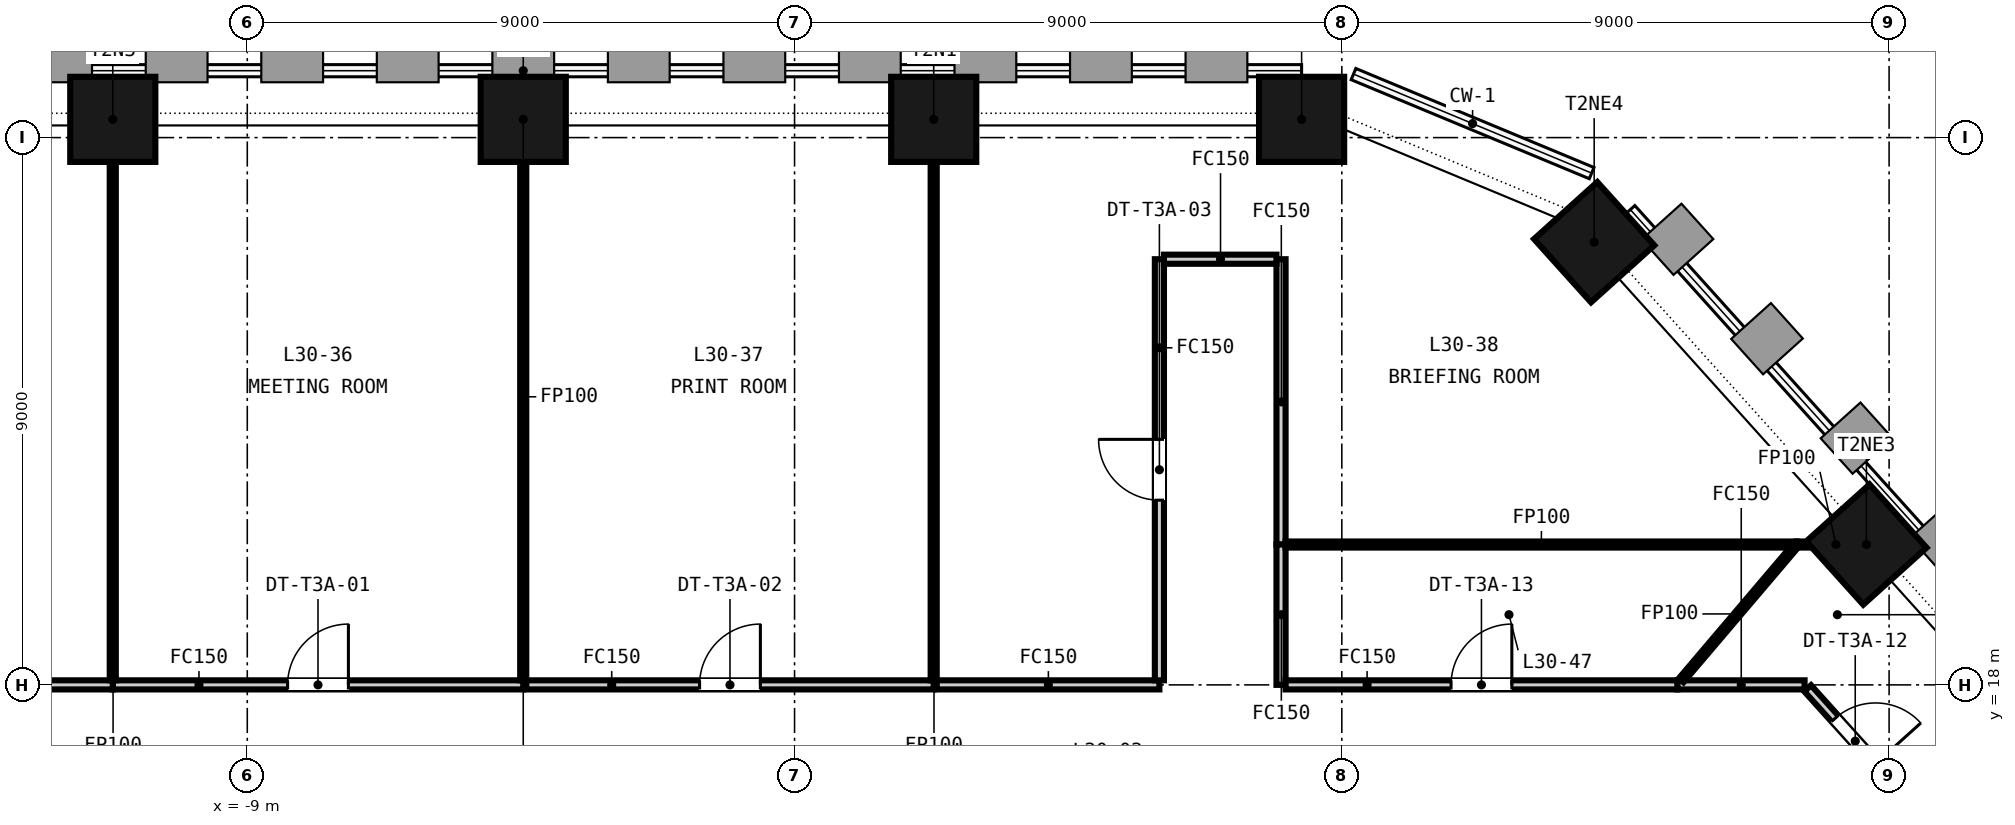
"""IFC4 building model, lengths in metres.
Left out: names, types, materials, properties, quantities, classifications, styles, units other than length and angle.
Written with IfcOpenShell. Run it as: python <this file> out.ifc"""

import sys

from ifc_helpers import new_model, si_unit, direction, frame, frame_2d, origin, origin_2d, place, context, subcontext, project, spatial, rectangle, extrude, element, fill, save


model = new_model("IFC4")
c1 = context("Model", 3, precision=1e-05, world=origin(), true_north=direction((0.0, 1.0)))
c2 = subcontext(c1, "Body", "Model", "MODEL_VIEW")
j1 = project(units=[si_unit("LENGTHUNIT", "METRE"), si_unit("PLANEANGLEUNIT", "RADIAN")], contexts=[c1])
p1 = place(None, origin())
s1 = spatial("IfcSite", under=j1, at=p1, CompositionType="ELEMENT")
p2 = place(p1, origin())
s2 = spatial("IfcBuilding", under=s1, at=p2, CompositionType="ELEMENT")
p3 = place(p2, frame((0.0, 0.0, 126.15)))
s3 = spatial("IfcBuildingStorey", under=s2, at=p3, CompositionType="ELEMENT", Elevation=126.15)
for number, where, z_axis, x_axis in (
    (1, (8.339, 27.3, -0.15), (0.0, 0.0, 1.0), (-1.0, 0.0, 0.0)),
    (2, (2.288, 27.3, -0.15), (0.0, 0.0, 1.0), (-1.0, 0.0, 0.0)),
    (3, (-4.462, 27.3, -0.15), (0.0, 0.0, 1.0), (-1.0, 0.0, 0.0)),
    (4, (-11.212, 27.3, -0.15), (0.0, 0.0, 1.0), (-1.0, 0.0, 0.0)),
    (5, (17.627, 20.308, -0.15), (0.0, 0.0, 1.0), (-0.669, 0.743, 0.0)),
    (6, (13.15, 25.28, -0.15), (0.0, 0.0, 1.0), (-0.669, 0.743, 0.0)),
):
    element("IfcColumn", number, at=place(p3, frame(where, z_axis=z_axis, x_axis=x_axis)), inside=s3, PredefinedType="COLUMN", context=c2, shape_type="SweptSolid", body=[
        extrude(rectangle(XDim=1.4, YDim=1.4, at=origin_2d()), origin(), (0.0, 0.0, 1.0), 3.65),
    ])
p4 = place(p3, frame((8.0, 25.0, 0.0), z_axis=(0.0, 0.0, 1.0), x_axis=(0.0, -1.0, 0.0)))
e7 = element("IfcWall", 7, at=p4, inside=s3, PredefinedType="PARTITIONING", context=c2, shape_type="SweptSolid", body=[
    extrude(rectangle(XDim=4.692, YDim=0.15, at=frame_2d((2.346, 0.0))), origin(), (0.0, 0.0, 1.0), 2.741),
])
p5 = place(p3, frame((8.0, 20.308, 0.0), z_axis=(0.0, 0.0, 1.0), x_axis=(0.0, -1.0, 0.0)))
e8 = element("IfcWall", 8, at=p5, inside=s3, PredefinedType="PARTITIONING", context=c2, shape_type="SweptSolid", body=[
    extrude(rectangle(XDim=2.308, YDim=0.15, at=frame_2d((1.154, 0.0))), origin(), (0.0, 0.0, 1.0), 2.741),
])
p6 = place(p3, frame((-11.212, 18.0, 0.0), z_axis=(0.0, 0.0, 1.0), x_axis=(1.0, 0.0, 0.0)))
e9 = element("IfcWall", 9, at=p6, inside=s3, PredefinedType="PARTITIONING", context=c2, shape_type="SweptSolid", body=[
    extrude(rectangle(XDim=6.75, YDim=0.15, at=frame_2d((3.375, 0.0))), origin(), (0.0, 0.0, 1.0), 2.741),
])
p7 = place(p6, frame((2.875, 0.0, 0.0)))
e10 = element("IfcOpeningElement", 10, at=p7, cuts=e9, PredefinedType="OPENING", context=c2, shape_type="SweptSolid", body=[
    extrude(rectangle(XDim=1.0, YDim=2.1, at=frame_2d((0.5, 1.05))), frame((0.0, 0.085, 0.0), z_axis=(0.0, -1.0, 0.0), x_axis=(1.0, 0.0, 0.0)), (0.0, 0.0, 1.0), 0.17),
])
p8 = place(p3, frame((-4.462, 18.075, 0.0), z_axis=(0.0, 0.0, 1.0), x_axis=(0.0, 1.0, 0.0)))
e11 = element("IfcWall", 11, at=p8, inside=s3, PredefinedType="PARTITIONING", context=c2, shape_type="SweptSolid", body=[
    extrude(rectangle(XDim=9.325, YDim=0.1, at=frame_2d((4.663, 0.0))), origin(), (0.0, 0.0, 1.0), 2.741),
])
p9 = place(p3, frame((-4.412, 18.0, 0.0), z_axis=(0.0, 0.0, 1.0), x_axis=(1.0, 0.0, 0.0)))
e12 = element("IfcWall", 12, at=p9, inside=s3, PredefinedType="PARTITIONING", context=c2, shape_type="SweptSolid", body=[
    extrude(rectangle(XDim=6.7, YDim=0.15, at=frame_2d((3.35, 0.0))), origin(), (0.0, 0.0, 1.0), 2.741),
])
p10 = place(p9, frame((2.85, 0.0, 0.0)))
e13 = element("IfcOpeningElement", 13, at=p10, cuts=e12, PredefinedType="OPENING", context=c2, shape_type="SweptSolid", body=[
    extrude(rectangle(XDim=1.0, YDim=2.1, at=frame_2d((0.5, 1.05))), frame((0.0, 0.085, 0.0), z_axis=(0.0, -1.0, 0.0), x_axis=(1.0, 0.0, 0.0)), (0.0, 0.0, 1.0), 0.17),
])
p11 = place(p3, frame((2.288, 18.075, 0.0), z_axis=(0.0, 0.0, 1.0), x_axis=(0.0, 1.0, 0.0)))
e14 = element("IfcWall", 14, at=p11, inside=s3, PredefinedType="PARTITIONING", context=c2, shape_type="SweptSolid", body=[
    extrude(rectangle(XDim=9.325, YDim=0.1, at=frame_2d((4.663, 0.0))), origin(), (0.0, 0.0, 1.0), 2.741),
])
p12 = place(p3, frame((2.338, 18.0, 0.0), z_axis=(0.0, 0.0, 1.0), x_axis=(1.0, 0.0, 0.0)))
e15 = element("IfcWall", 15, at=p12, inside=s3, PredefinedType="PARTITIONING", context=c2, shape_type="SweptSolid", body=[
    extrude(rectangle(XDim=3.662, YDim=0.15, at=frame_2d((1.831, 0.0))), origin(), (0.0, 0.0, 1.0), 2.741),
])
p13 = place(p3, frame((6.0, 18.075, 0.0), z_axis=(0.0, 0.0, 1.0), x_axis=(0.0, 1.0, 0.0)))
e16 = element("IfcWall", 16, at=p13, inside=s3, PredefinedType="PARTITIONING", context=c2, shape_type="SweptSolid", body=[
    extrude(rectangle(XDim=6.925, YDim=0.15, at=frame_2d((3.462, 0.0))), origin(), (0.0, 0.0, 1.0), 2.741),
])
p14 = place(p13, frame((2.962, 0.0, 0.0)))
e17 = element("IfcOpeningElement", 17, at=p14, cuts=e16, PredefinedType="OPENING", context=c2, shape_type="SweptSolid", body=[
    extrude(rectangle(XDim=1.0, YDim=2.1, at=frame_2d((0.5, 1.05))), frame((0.0, 0.085, 0.0), z_axis=(0.0, -1.0, 0.0), x_axis=(1.0, 0.0, 0.0)), (0.0, 0.0, 1.0), 0.17),
])
p15 = place(p3, frame((6.075, 25.0, 0.0), z_axis=(0.0, 0.0, 1.0), x_axis=(1.0, 0.0, 0.0)))
e18 = element("IfcWall", 18, at=p15, inside=s3, PredefinedType="PARTITIONING", context=c2, shape_type="SweptSolid", body=[
    extrude(rectangle(XDim=1.85, YDim=0.15, at=frame_2d((0.925, 0.0))), origin(), (0.0, 0.0, 1.0), 2.741),
])
p16 = place(p3, frame((16.479, 20.308, 0.0), z_axis=(0.0, 0.0, 1.0), x_axis=(1.0, 0.0, 0.0)))
e19 = element("IfcWall", 19, at=p16, inside=s3, PredefinedType="PARTITIONING", context=c2, shape_type="SweptSolid", body=[
    extrude(rectangle(XDim=1.283, YDim=0.1, at=frame_2d((0.642, 0.0))), origin(), (0.0, 0.0, 1.0), 2.741),
])
p17 = place(p3, frame((8.075, 20.308, 0.0), z_axis=(0.0, 0.0, 1.0), x_axis=(1.0, 0.0, 0.0)))
e20 = element("IfcWall", 20, at=p17, inside=s3, PredefinedType="PARTITIONING", context=c2, shape_type="SweptSolid", body=[
    extrude(rectangle(XDim=8.404, YDim=0.1, at=frame_2d((4.202, 0.0))), origin(), (0.0, 0.0, 1.0), 2.741),
])
p18 = place(p3, frame((-17.449, 18.0, 0.0), z_axis=(0.0, 0.0, 1.0), x_axis=(1.0, 0.0, 0.0)))
e21 = element("IfcWall", 21, at=p18, inside=s3, PredefinedType="PARTITIONING", context=c2, shape_type="SweptSolid", body=[
    extrude(rectangle(XDim=6.237, YDim=0.15, at=frame_2d((3.119, 0.0))), origin(), (0.0, 0.0, 1.0), 2.741),
])
p19 = place(p3, frame((-11.212, 18.075, 0.0), z_axis=(0.0, 0.0, 1.0), x_axis=(0.0, 1.0, 0.0)))
e22 = element("IfcWall", 22, at=p19, inside=s3, PredefinedType="PARTITIONING", context=c2, shape_type="SweptSolid", body=[
    extrude(rectangle(XDim=9.325, YDim=0.1, at=frame_2d((4.663, 0.0))), origin(), (0.0, 0.0, 1.0), 2.741),
])
p20 = place(p3, frame((14.517, 18.0, 0.0), z_axis=(0.0, 0.0, 1.0), x_axis=(1.0, 0.0, 0.0)))
e23 = element("IfcWall", 23, at=p20, inside=s3, PredefinedType="PARTITIONING", context=c2, shape_type="SweptSolid", body=[
    extrude(rectangle(XDim=2.093, YDim=0.15, at=frame_2d((1.046, 0.0))), origin(), (0.0, 0.0, 1.0), 2.741),
])
p21 = place(p3, frame((16.66, 17.944, 0.0), z_axis=(0.0, 0.0, 1.0), x_axis=(0.669103043777, -0.743169642012, 0.0)))
e24 = element("IfcWall", 24, at=p21, inside=s3, PredefinedType="PARTITIONING", context=c2, shape_type="SweptSolid", body=[
    extrude(rectangle(XDim=2.34, YDim=0.15, at=frame_2d((1.17, 0.0))), origin(), (0.0, 0.0, 1.0), 2.741),
])
p22 = place(p21, frame((0.67, 0.0, 0.0)))
e25 = element("IfcOpeningElement", 25, at=p22, cuts=e24, PredefinedType="OPENING", context=c2, shape_type="SweptSolid", body=[
    extrude(rectangle(XDim=1.0, YDim=2.1, at=frame_2d((0.5, 1.05))), frame((0.0, 0.085, 0.0), z_axis=(0.0, -1.0, 0.0), x_axis=(1.0, 0.0, 0.0)), (0.0, 0.0, 1.0), 0.17),
])
p23 = place(p3, frame((18.455, 15.825, 0.0), z_axis=(0.0, 0.0, 1.0), x_axis=(0.647780060511, 0.761827403815, 0.0)))
e26 = element("IfcWall", 26, at=p23, inside=s3, PredefinedType="PARTITIONING", context=c2, shape_type="SweptSolid", body=[
    extrude(rectangle(XDim=2.207, YDim=0.1, at=frame_2d((1.104, 0.0))), origin(), (0.0, 0.0, 1.0), 2.741),
])
p24 = place(p3, frame((8.075, 18.0, 0.0), z_axis=(0.0, 0.0, 1.0), x_axis=(1.0, 0.0, 0.0)))
e27 = element("IfcWall", 27, at=p24, inside=s3, PredefinedType="PARTITIONING", context=c2, shape_type="SweptSolid", body=[
    extrude(rectangle(XDim=6.442, YDim=0.15, at=frame_2d((3.221, 0.0))), origin(), (0.0, 0.0, 1.0), 2.741),
])
p25 = place(p24, frame((2.721, 0.0, 0.0)))
e28 = element("IfcOpeningElement", 28, at=p25, cuts=e27, PredefinedType="OPENING", context=c2, shape_type="SweptSolid", body=[
    extrude(rectangle(XDim=1.0, YDim=2.1, at=frame_2d((0.5, 1.05))), frame((0.0, 0.085, 0.0), z_axis=(0.0, -1.0, 0.0), x_axis=(1.0, 0.0, 0.0)), (0.0, 0.0, 1.0), 0.17),
])
p26 = place(p3, frame((14.581, 18.075, 0.0), z_axis=(0.0, 0.0, 1.0), x_axis=(0.6476632602, 0.761926703422, 0.0)))
e29 = element("IfcWall", 29, at=p26, inside=s3, PredefinedType="PARTITIONING", context=c2, shape_type="SweptSolid", body=[
    extrude(rectangle(XDim=2.865, YDim=0.1, at=frame_2d((1.433, 0.0))), origin(), (0.0, 0.0, 1.0), 2.741),
])
p27 = place(p7, origin())
e30 = element("IfcDoor", 30, at=p27, inside=s3, OperationType="SINGLE_SWING_RIGHT", PredefinedType="DOOR", context=c2, shape_type="SweptSolid", body=[
    extrude(rectangle(XDim=1.0, YDim=2.1, at=frame_2d((0.5, 1.05))), frame((0.0, 0.025, 0.0), z_axis=(0.0, -1.0, 0.0), x_axis=(1.0, 0.0, 0.0)), (0.0, 0.0, 1.0), 0.05),
])
fill(e10, e30)
p28 = place(p10, origin())
e31 = element("IfcDoor", 31, at=p28, inside=s3, OperationType="SINGLE_SWING_RIGHT", PredefinedType="DOOR", context=c2, shape_type="SweptSolid", body=[
    extrude(rectangle(XDim=1.0, YDim=2.1, at=frame_2d((0.5, 1.05))), frame((0.0, 0.025, 0.0), z_axis=(0.0, -1.0, 0.0), x_axis=(1.0, 0.0, 0.0)), (0.0, 0.0, 1.0), 0.05),
])
fill(e13, e31)
p29 = place(p14, origin())
e32 = element("IfcDoor", 32, at=p29, inside=s3, OperationType="SINGLE_SWING_RIGHT", PredefinedType="DOOR", context=c2, shape_type="SweptSolid", body=[
    extrude(rectangle(XDim=1.0, YDim=2.1, at=frame_2d((0.5, 1.05))), frame((0.0, 0.025, 0.0), z_axis=(0.0, -1.0, 0.0), x_axis=(1.0, 0.0, 0.0)), (0.0, 0.0, 1.0), 0.05),
])
fill(e17, e32)
p30 = place(p22, origin())
e33 = element("IfcDoor", 33, at=p30, inside=s3, OperationType="SINGLE_SWING_RIGHT", PredefinedType="DOOR", context=c2, shape_type="SweptSolid", body=[
    extrude(rectangle(XDim=1.0, YDim=2.1, at=frame_2d((0.5, 1.05))), frame((0.0, 0.025, 0.0), z_axis=(0.0, -1.0, 0.0), x_axis=(1.0, 0.0, 0.0)), (0.0, 0.0, 1.0), 0.05),
])
fill(e25, e33)
p31 = place(p25, origin())
e34 = element("IfcDoor", 34, at=p31, inside=s3, OperationType="SINGLE_SWING_RIGHT", PredefinedType="DOOR", context=c2, shape_type="SweptSolid", body=[
    extrude(rectangle(XDim=1.0, YDim=2.1, at=frame_2d((0.5, 1.05))), frame((0.0, 0.025, 0.0), z_axis=(0.0, -1.0, 0.0), x_axis=(1.0, 0.0, 0.0)), (0.0, 0.0, 1.0), 0.05),
])
fill(e28, e34)
save(model, sys.argv[1])
